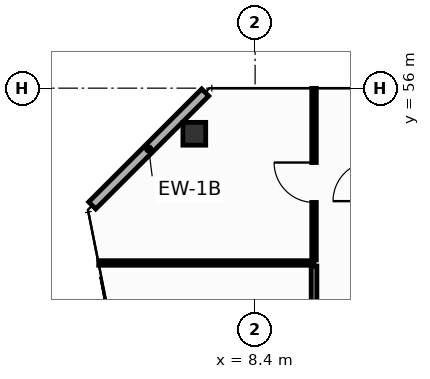
"""IFC4 building model, lengths in metres.
Left out: names, types, materials, properties, quantities, classifications, styles, units other than length and angle.
Written with IfcOpenShell. Run it as: python <this file> out.ifc"""

import sys

from ifc_helpers import new_model, si_unit, direction, frame, frame_2d, origin, origin_2d, place, context, subcontext, project, spatial, rectangle, hollow_rectangle, extrude, element, fill, save


model = new_model("IFC4")
c1 = context("Model", 3, precision=1e-05, world=origin(), true_north=direction((0.0, 1.0)))
c2 = subcontext(c1, "Body", "Model", "MODEL_VIEW")
j1 = project(units=[si_unit("LENGTHUNIT", "METRE"), si_unit("PLANEANGLEUNIT", "RADIAN")], contexts=[c1])
p1 = place(None, origin())
s1 = spatial("IfcSite", under=j1, at=p1, CompositionType="ELEMENT")
p2 = place(p1, origin())
s2 = spatial("IfcBuilding", under=s1, at=p2, CompositionType="ELEMENT")
p3 = place(p2, frame((0.0, 0.0, 295.2)))
s3 = spatial("IfcBuildingStorey", under=s2, at=p3, CompositionType="ELEMENT", Elevation=295.2)
p4 = place(p3, frame((6.8, 54.8, 0.0), z_axis=(0.0, 0.0, 1.0), x_axis=(1.0, 0.0, 0.0)))
e1 = element("IfcColumn", 1, at=p4, inside=s3, PredefinedType="COLUMN", context=c2, shape_type="SweptSolid", body=[
    extrude(hollow_rectangle(XDim=0.6, YDim=0.6, WallThickness=0.028, at=origin_2d()), origin(), (0.0, 0.0, 1.0), 3.8),
])
p5 = place(p3, frame((7.087, 55.887, 0.0), z_axis=(0.0, 0.0, 1.0), x_axis=(-0.707106781187, -0.707106781187, 0.0)))
e2 = element("IfcWall", 2, at=p5, inside=s3, PredefinedType="STANDARD", context=c2, shape_type="SweptSolid", body=[
    extrude(rectangle(XDim=4.206, YDim=0.26, at=frame_2d((2.103, 0.0))), origin(), (0.0, 0.0, 1.0), 3.55),
])
p6 = place(p3, frame((4.283, 51.4, 0.0), z_axis=(0.0, 0.0, 1.0), x_axis=(1.0, 0.0, 0.0)))
e3 = element("IfcWall", 3, at=p6, inside=s3, PredefinedType="PARTITIONING", context=c2, shape_type="SweptSolid", body=[
    extrude(rectangle(XDim=5.667, YDim=0.12, at=frame_2d((2.833, 0.0))), origin(), (0.0, 0.0, 1.0), 2.947),
])
p7 = place(p3, frame((9.95, 46.88, 0.0), z_axis=(0.0, 0.0, 1.0), x_axis=(0.0, 1.0, 0.0)))
e4 = element("IfcWall", 4, at=p7, inside=s3, PredefinedType="PARTITIONING", context=c2, shape_type="SweptSolid", body=[
    extrude(rectangle(XDim=4.44, YDim=0.15, at=frame_2d((2.22, 0.0))), origin(), (0.0, 0.0, 1.0), 3.55),
])
p8 = place(p7, frame((1.695, 0.0, 0.0)))
e5 = element("IfcOpeningElement", 5, at=p8, cuts=e4, PredefinedType="OPENING", context=c2, shape_type="SweptSolid", body=[
    extrude(rectangle(XDim=1.05, YDim=2.15, at=frame_2d((0.525, 1.075))), frame((0.0, 0.085, 0.0), z_axis=(0.0, -1.0, 0.0), x_axis=(1.0, 0.0, 0.0)), (0.0, 0.0, 1.0), 0.17),
])
p9 = place(p3, frame((9.95, 51.48, 0.0), z_axis=(0.0, 0.0, 1.0), x_axis=(0.0, 1.0, 0.0)))
e6 = element("IfcWall", 6, at=p9, inside=s3, PredefinedType="PARTITIONING", context=c2, shape_type="SweptSolid", body=[
    extrude(rectangle(XDim=4.515, YDim=0.12, at=frame_2d((2.258, 0.0))), origin(), (0.0, 0.0, 1.0), 2.935),
])
p10 = place(p9, frame((1.513, 0.0, 0.0)))
e7 = element("IfcOpeningElement", 7, at=p10, cuts=e6, PredefinedType="OPENING", context=c2, shape_type="SweptSolid", body=[
    extrude(rectangle(XDim=1.05, YDim=2.15, at=frame_2d((0.525, 1.075))), frame((0.0, 0.07, 0.0), z_axis=(0.0, -1.0, 0.0), x_axis=(1.0, 0.0, 0.0)), (0.0, 0.0, 1.0), 0.14),
])
p11 = place(p10, origin())
e8 = element("IfcDoor", 8, at=p11, inside=s3, OperationType="SINGLE_SWING_RIGHT", PredefinedType="DOOR", context=c2, shape_type="SweptSolid", body=[
    extrude(rectangle(XDim=1.05, YDim=2.15, at=frame_2d((0.525, 1.075))), frame((0.0, 0.025, 0.0), z_axis=(0.0, -1.0, 0.0), x_axis=(1.0, 0.0, 0.0)), (0.0, 0.0, 1.0), 0.05),
])
fill(e7, e8)
save(model, sys.argv[1])
